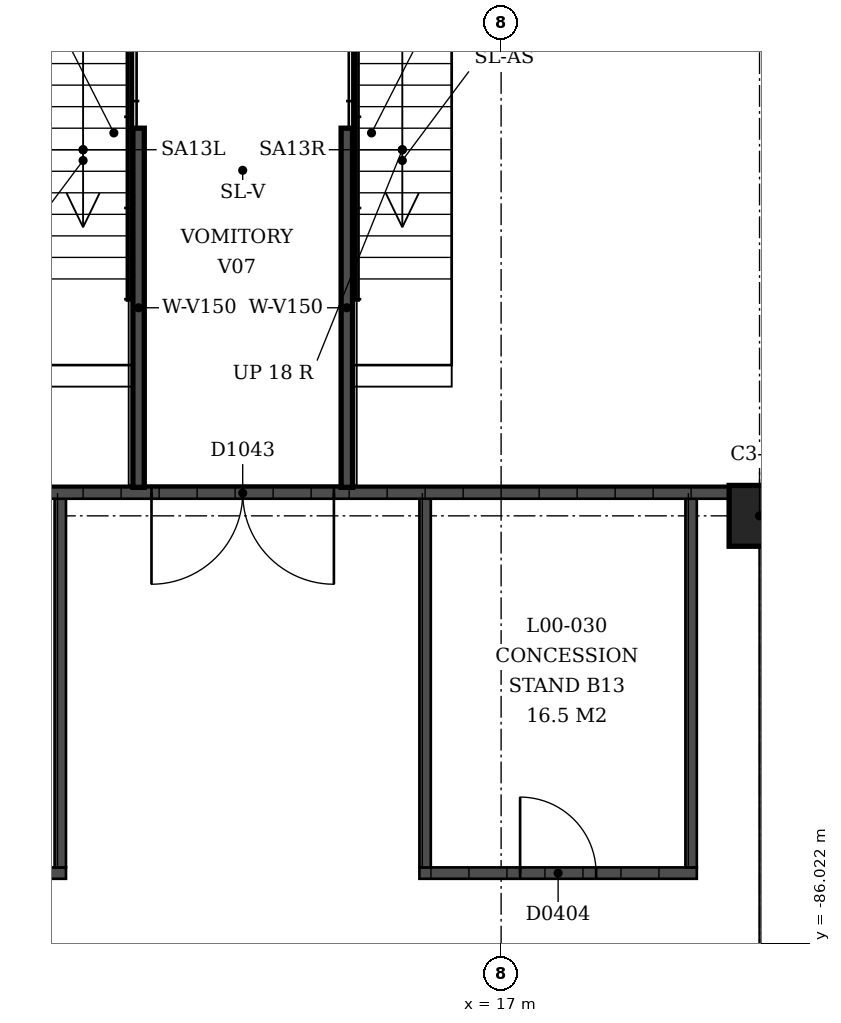
"""IFC4 building model, lengths in metres.
Left out: names, types, materials, properties, quantities, classifications, styles, units other than length and angle.
Written with IfcOpenShell. Run it as: python <this file> out.ifc"""

import sys

from ifc_helpers import new_model, si_unit, direction, frame, frame_2d, origin, origin_2d, place, context, subcontext, project, spatial, rectangle, extrude, element, fill, save


model = new_model("IFC4")
c1 = context("Model", 3, precision=1e-05, world=origin(), true_north=direction((0.0, 1.0)))
c2 = subcontext(c1, "Body", "Model", "MODEL_VIEW")
j1 = project(units=[si_unit("LENGTHUNIT", "METRE"), si_unit("PLANEANGLEUNIT", "RADIAN")], contexts=[c1])
p1 = place(None, origin())
s1 = spatial("IfcSite", under=j1, at=p1, CompositionType="ELEMENT")
p2 = place(p1, origin())
s2 = spatial("IfcBuilding", under=s1, at=p2, CompositionType="ELEMENT")
p3 = place(p2, origin())
s3 = spatial("IfcBuildingStorey", under=s2, at=p3, CompositionType="ELEMENT", Elevation=0.0)
p4 = place(p3, frame((20.4, -80.4, 0.0), z_axis=(0.0, 0.0, 1.0), x_axis=(1.0, 0.0, 0.0)))
e1 = element("IfcColumn", 1, at=p4, inside=s3, PredefinedType="COLUMN", context=c2, shape_type="SweptSolid", body=[
    extrude(rectangle(XDim=0.8, YDim=0.8, at=origin_2d()), origin(), (0.0, 0.0, 1.0), 4.5),
])
p5 = place(p3, frame((7.625, -85.1, 0.0), z_axis=(0.0, 0.0, 1.0), x_axis=(1.0, 0.0, 0.0)))
e2 = element("IfcWall", 2, at=p5, inside=s3, PredefinedType="SOLIDWALL", context=c2, shape_type="SweptSolid", body=[
    extrude(rectangle(XDim=3.65, YDim=0.15, at=frame_2d((1.825, 0.0))), origin(), (0.0, 0.0, 1.0), 3.0),
])
p6 = place(p5, frame((1.325, 0.0, 0.0)))
e3 = element("IfcOpeningElement", 3, at=p6, cuts=e2, PredefinedType="OPENING", context=c2, shape_type="SweptSolid", body=[
    extrude(rectangle(XDim=1.0, YDim=2.1, at=frame_2d((0.5, 1.05))), frame((0.0, 0.075, 0.0), z_axis=(0.0, -1.0, 0.0), x_axis=(1.0, 0.0, 0.0)), (0.0, 0.0, 1.0), 0.15),
])
p7 = place(p3, frame((11.2, -80.1, 0.0), z_axis=(0.0, 0.0, 1.0), x_axis=(0.0, -1.0, 0.0)))
e4 = element("IfcWall", 4, at=p7, inside=s3, PredefinedType="SOLIDWALL", context=c2, shape_type="SweptSolid", body=[
    extrude(rectangle(XDim=4.925, YDim=0.15, at=frame_2d((2.462, 0.0))), origin(), (0.0, 0.0, 1.0), 3.0),
])
p8 = place(p3, frame((15.925, -85.1, 0.0), z_axis=(0.0, 0.0, 1.0), x_axis=(1.0, 0.0, 0.0)))
e5 = element("IfcWall", 5, at=p8, inside=s3, PredefinedType="SOLIDWALL", context=c2, shape_type="SweptSolid", body=[
    extrude(rectangle(XDim=3.65, YDim=0.15, at=frame_2d((1.825, 0.0))), origin(), (0.0, 0.0, 1.0), 3.0),
])
p9 = place(p8, frame((1.325, 0.0, 0.0)))
e6 = element("IfcOpeningElement", 6, at=p9, cuts=e5, PredefinedType="OPENING", context=c2, shape_type="SweptSolid", body=[
    extrude(rectangle(XDim=1.0, YDim=2.1, at=frame_2d((0.5, 1.05))), frame((0.0, 0.075, 0.0), z_axis=(0.0, -1.0, 0.0), x_axis=(1.0, 0.0, 0.0)), (0.0, 0.0, 1.0), 0.15),
])
for number, where, z_axis, x_axis in (
    (7, (16.0, -80.1, 0.0), (0.0, 0.0, 1.0), (0.0, -1.0, 0.0)),
    (8, (19.5, -80.1, 0.0), (0.0, 0.0, 1.0), (0.0, -1.0, 0.0)),
):
    element("IfcWall", number, at=place(p3, frame(where, z_axis=z_axis, x_axis=x_axis)), inside=s3, PredefinedType="SOLIDWALL", context=c2, shape_type="SweptSolid", body=[
        extrude(rectangle(XDim=4.925, YDim=0.15, at=frame_2d((2.462, 0.0))), origin(), (0.0, 0.0, 1.0), 3.0),
    ])
p10 = place(p3, frame((20.0, -80.1, 0.0), z_axis=(0.0, 0.0, 1.0), x_axis=(-1.0, 0.0, 0.0)))
e9 = element("IfcWall", 9, at=p10, inside=s3, PredefinedType="SOLIDWALL", context=c2, shape_type="SweptSolid", body=[
    extrude(rectangle(XDim=12.7, YDim=0.15, at=frame_2d((6.35, 0.0))), origin(), (0.0, 0.0, 1.0), 3.0),
])
p11 = place(p10, frame((5.2, 0.0, 0.0)))
e10 = element("IfcOpeningElement", 10, at=p11, cuts=e9, PredefinedType="OPENING", context=c2, shape_type="SweptSolid", body=[
    extrude(rectangle(XDim=2.4, YDim=2.4, at=frame_2d((1.2, 1.2))), frame((0.0, 0.075, 0.0), z_axis=(0.0, -1.0, 0.0), x_axis=(1.0, 0.0, 0.0)), (0.0, 0.0, 1.0), 0.15),
])
for number, where, z_axis, x_axis in (
    (11, (12.23, -75.3, 0.0), (0.0, 0.0, 1.0), (0.0, -1.0, 0.0)),
    (12, (14.97, -75.3, 0.0), (0.0, 0.0, 1.0), (0.0, -1.0, 0.0)),
):
    element("IfcWall", number, at=place(p3, frame(where, z_axis=z_axis, x_axis=x_axis)), inside=s3, PredefinedType="SOLIDWALL", context=c2, shape_type="SweptSolid", body=[
        extrude(rectangle(XDim=4.725, YDim=0.15, at=frame_2d((2.362, 0.0))), origin(), (0.0, 0.0, 1.0), 2.75),
    ])
p12 = place(p9, origin())
e13 = element("IfcDoor", 13, at=p12, inside=s3, OperationType="SINGLE_SWING_RIGHT", PredefinedType="DOOR", context=c2, shape_type="SweptSolid", body=[
    extrude(rectangle(XDim=1.0, YDim=2.1, at=frame_2d((0.5, 1.05))), frame((0.0, 0.025, 0.0), z_axis=(0.0, -1.0, 0.0), x_axis=(1.0, 0.0, 0.0)), (0.0, 0.0, 1.0), 0.05),
])
fill(e6, e13)
p13 = place(p11, origin())
e14 = element("IfcDoor", 14, at=p13, inside=s3, OperationType="DOUBLE_DOOR_SINGLE_SWING", PredefinedType="DOOR", context=c2, shape_type="SweptSolid", body=[
    extrude(rectangle(XDim=2.4, YDim=2.4, at=frame_2d((1.2, 1.2))), frame((0.0, 0.025, 0.0), z_axis=(0.0, -1.0, 0.0), x_axis=(1.0, 0.0, 0.0)), (0.0, 0.0, 1.0), 0.05),
])
fill(e10, e14)
save(model, sys.argv[1])
